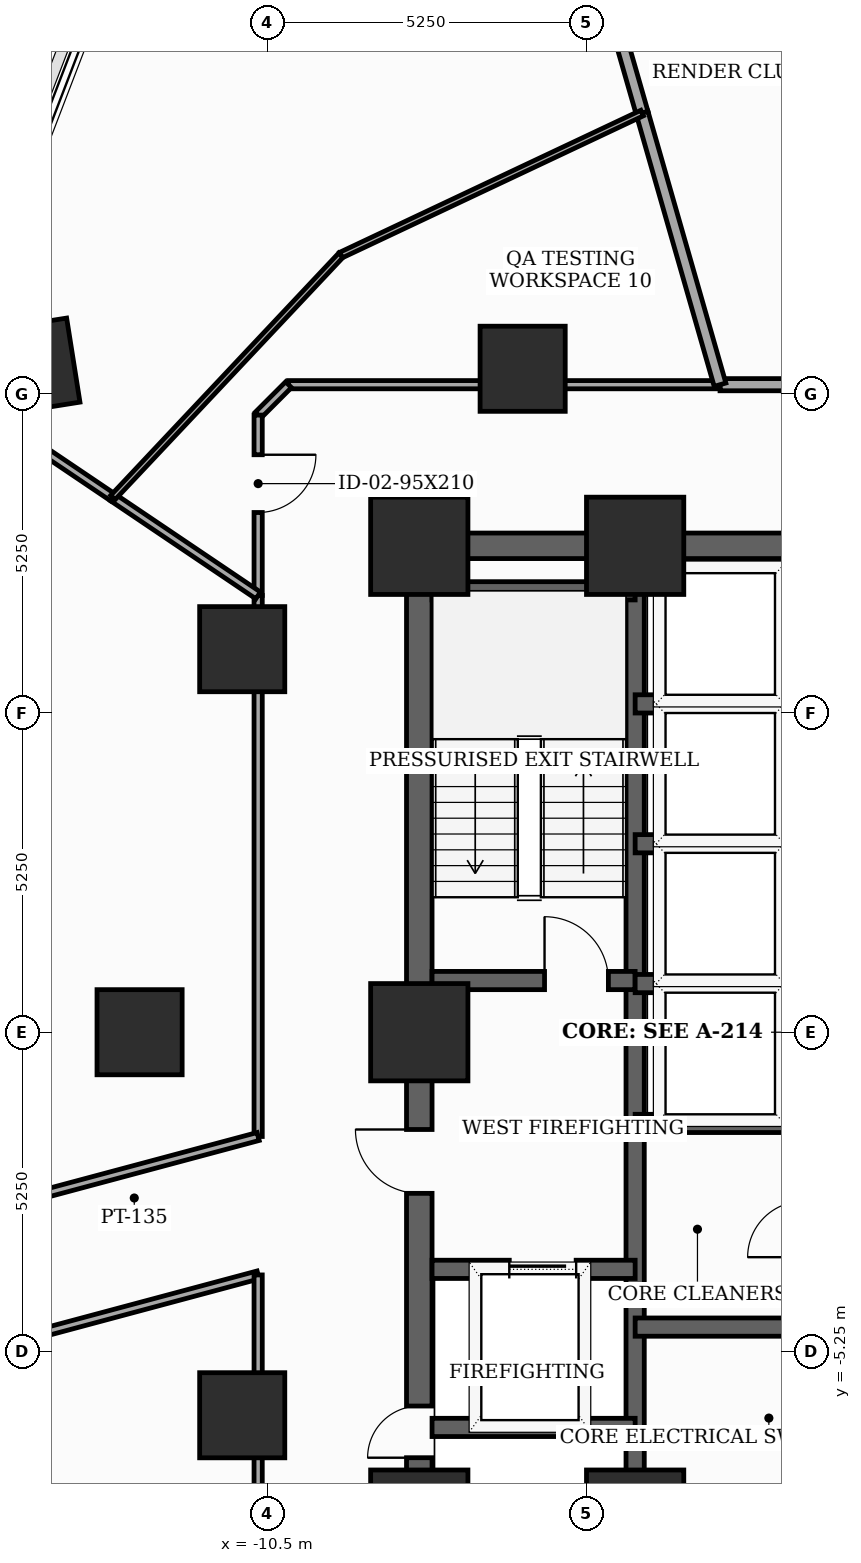
"""IFC4 building model, lengths in metres.
Left out: names, types, materials, properties, quantities, classifications, styles, units other than length and angle.
Written with IfcOpenShell. Run it as: python <this file> out.ifc"""

import sys

from ifc_helpers import new_model, si_unit, direction, frame, frame_2d, origin, origin_2d, place, context, subcontext, project, spatial, rectangle, extrude, element, fill, save


model = new_model("IFC4")
c1 = context("Model", 3, precision=1e-05, world=origin(), true_north=direction((0.0, 1.0)))
c2 = subcontext(c1, "Body", "Model", "MODEL_VIEW")
j1 = project(units=[si_unit("LENGTHUNIT", "METRE"), si_unit("PLANEANGLEUNIT", "RADIAN")], contexts=[c1])
p1 = place(None, origin())
s1 = spatial("IfcSite", under=j1, at=p1, CompositionType="ELEMENT")
p2 = place(p1, origin())
s2 = spatial("IfcBuilding", under=s1, at=p2, CompositionType="ELEMENT")
p3 = place(p2, frame((0.0, 0.0, 59.3)))
s3 = spatial("IfcBuildingStorey", under=s2, at=p3, CompositionType="ELEMENT", Elevation=59.3)
for number, where, z_axis, x_axis in (
    (1, (-8.0, -8.0, 0.0), (0.0, 0.0, 1.0), (1.0, 0.0, 0.0)),
    (2, (-4.45, -8.0, 0.0), (0.0, 0.0, 1.0), (1.0, 0.0, 0.0)),
    (3, (-4.45, 8.0, 0.0), (0.0, 0.0, 1.0), (1.0, 0.0, 0.0)),
    (4, (-8.0, 8.0, 0.0), (0.0, 0.0, 1.0), (1.0, 0.0, 0.0)),
    (5, (-8.0, 0.0, 0.0), (0.0, 0.0, 1.0), (1.0, 0.0, 0.0)),
):
    element("IfcColumn", number, at=place(p3, frame(where, z_axis=z_axis, x_axis=x_axis)), inside=s3, PredefinedType="COLUMN", context=c2, shape_type="SweptSolid", body=[
        extrude(rectangle(XDim=1.6, YDim=1.6, at=origin_2d()), origin(), (0.0, 0.0, 1.0), 3.7),
    ])
for number, where, z_axis, x_axis in (
    (6, (-6.3, 10.912, 0.0), (0.0, 0.0, 1.0), (1.0, 0.0, 0.0)),
    (7, (-10.912, 6.3, 0.0), (0.0, 0.0, 1.0), (1.0, 0.0, 0.0)),
    (8, (-12.6, 0.0, 0.0), (0.0, 0.0, 1.0), (1.0, 0.0, 0.0)),
    (9, (-10.912, -6.3, 0.0), (0.0, 0.0, 1.0), (1.0, 0.0, 0.0)),
    (10, (-14.381, 10.945, 0.0), (0.0, 0.0, 1.0), (0.988, 0.156, 0.0)),
):
    element("IfcColumn", number, at=place(p3, frame(where, z_axis=z_axis, x_axis=x_axis)), inside=s3, PredefinedType="COLUMN", context=c2, shape_type="SweptSolid", body=[
        extrude(rectangle(XDim=1.4, YDim=1.4, at=origin_2d()), origin(), (0.0, 0.0, 1.0), 3.7),
    ])
p4 = place(p3, frame((-8.0, -8.0, 0.0), z_axis=(0.0, 0.0, 1.0), x_axis=(0.0, 1.0, 0.0)))
e11 = element("IfcWall", 11, at=p4, inside=s3, PredefinedType="SHEAR", context=c2, shape_type="SweptSolid", body=[
    extrude(rectangle(XDim=16.0, YDim=0.42, at=frame_2d((8.0, 0.0))), origin(), (0.0, 0.0, 1.0), 3.5),
])
p5 = place(p4, frame((1.002, 0.0, 0.0)))
e12 = element("IfcOpeningElement", 12, at=p5, cuts=e11, PredefinedType="OPENING", context=c2, shape_type="SweptSolid", body=[
    extrude(rectangle(XDim=0.85, YDim=2.02, at=frame_2d((0.425, 1.01))), frame((0.0, 0.22, 0.0), z_axis=(0.0, -1.0, 0.0), x_axis=(1.0, 0.0, 0.0)), (0.0, 0.0, 1.0), 0.44),
])
p6 = place(p4, frame((5.35, 0.0, 0.0)))
e13 = element("IfcOpeningElement", 13, at=p6, cuts=e11, PredefinedType="OPENING", context=c2, shape_type="SweptSolid", body=[
    extrude(rectangle(XDim=1.05, YDim=2.15, at=frame_2d((0.525, 1.075))), frame((0.0, 0.22, 0.0), z_axis=(0.0, -1.0, 0.0), x_axis=(1.0, 0.0, 0.0)), (0.0, 0.0, 1.0), 0.44),
])
p7 = place(p3, frame((-8.0, 8.0, 0.0), z_axis=(0.0, 0.0, 1.0), x_axis=(1.0, 0.0, 0.0)))
e14 = element("IfcWall", 14, at=p7, inside=s3, PredefinedType="SHEAR", context=c2, shape_type="SweptSolid", body=[
    extrude(rectangle(XDim=16.0, YDim=0.42, at=frame_2d((8.0, 0.0))), origin(), (0.0, 0.0, 1.0), 3.5),
])
p8 = place(p7, frame((7.1, 0.0, 0.0)))
e15 = element("IfcOpeningElement", 15, at=p8, cuts=e14, PredefinedType="OPENING", context=c2, shape_type="SweptSolid", body=[
    extrude(rectangle(XDim=1.8, YDim=2.15, at=frame_2d((0.9, 1.075))), frame((0.0, 0.22, 0.0), z_axis=(0.0, -1.0, 0.0), x_axis=(1.0, 0.0, 0.0)), (0.0, 0.0, 1.0), 0.44),
])
p9 = place(p3, frame((-4.45, -7.79, 0.0), z_axis=(0.0, 0.0, 1.0), x_axis=(0.0, 1.0, 0.0)))
e16 = element("IfcWall", 16, at=p9, inside=s3, PredefinedType="SHEAR", context=c2, shape_type="SweptSolid", body=[
    extrude(rectangle(XDim=15.58, YDim=0.3, at=frame_2d((7.79, 0.0))), origin(), (0.0, 0.0, 1.0), 3.5),
])
p10 = place(p3, frame((-7.79, 0.85, 0.0), z_axis=(0.0, 0.0, 1.0), x_axis=(1.0, 0.0, 0.0)))
e17 = element("IfcWall", 17, at=p10, inside=s3, PredefinedType="SHEAR", context=c2, shape_type="SweptSolid", body=[
    extrude(rectangle(XDim=3.34, YDim=0.3, at=frame_2d((1.67, 0.0))), origin(), (0.0, 0.0, 1.0), 3.5),
])
p11 = place(p10, frame((1.85, 0.0, 0.0)))
e18 = element("IfcOpeningElement", 18, at=p11, cuts=e17, PredefinedType="OPENING", context=c2, shape_type="SweptSolid", body=[
    extrude(rectangle(XDim=1.05, YDim=2.15, at=frame_2d((0.525, 1.075))), frame((0.0, 0.16, 0.0), z_axis=(0.0, -1.0, 0.0), x_axis=(1.0, 0.0, 0.0)), (0.0, 0.0, 1.0), 0.32),
])
p12 = place(p3, frame((-7.79, 7.26, 0.0), z_axis=(0.0, 0.0, 1.0), x_axis=(1.0, 0.0, 0.0)))
e19 = element("IfcWall", 19, at=p12, inside=s3, PredefinedType="SHEAR", context=c2, shape_type="SweptSolid", body=[
    extrude(rectangle(XDim=3.34, YDim=0.3, at=frame_2d((1.67, 0.0))), origin(), (0.0, 0.0, 1.0), 3.5),
])
p13 = place(p3, frame((-7.79, -3.9, 0.0), z_axis=(0.0, 0.0, 1.0), x_axis=(1.0, 0.0, 0.0)))
e20 = element("IfcWall", 20, at=p13, inside=s3, PredefinedType="SHEAR", context=c2, shape_type="SweptSolid", body=[
    extrude(rectangle(XDim=3.34, YDim=0.3, at=frame_2d((1.67, 0.0))), origin(), (0.0, 0.0, 1.0), 3.5),
])
p14 = place(p13, frame((1.27, 0.0, 0.0)))
e21 = element("IfcOpeningElement", 21, at=p14, cuts=e20, PredefinedType="OPENING", context=c2, shape_type="SweptSolid", body=[
    extrude(rectangle(XDim=1.1, YDim=2.1, at=frame_2d((0.55, 1.05))), frame((0.0, 0.16, 0.0), z_axis=(0.0, -1.0, 0.0), x_axis=(1.0, 0.0, 0.0)), (0.0, 0.0, 1.0), 0.32),
])
p15 = place(p3, frame((-7.79, -6.5, 0.0), z_axis=(0.0, 0.0, 1.0), x_axis=(1.0, 0.0, 0.0)))
e22 = element("IfcWall", 22, at=p15, inside=s3, PredefinedType="SHEAR", context=c2, shape_type="SweptSolid", body=[
    extrude(rectangle(XDim=3.34, YDim=0.3, at=frame_2d((1.67, 0.0))), origin(), (0.0, 0.0, 1.0), 3.5),
])
p16 = place(p3, frame((-4.45, -4.85, 0.0), z_axis=(0.0, 0.0, 1.0), x_axis=(1.0, 0.0, 0.0)))
e23 = element("IfcWall", 23, at=p16, inside=s3, PredefinedType="SHEAR", context=c2, shape_type="SweptSolid", body=[
    extrude(rectangle(XDim=8.9, YDim=0.3, at=frame_2d((4.45, 0.0))), origin(), (0.0, 0.0, 1.0), 3.5),
])
for number, where, z_axis, x_axis in (
    (24, (-4.45, -1.5, 0.0), (0.0, 0.0, 1.0), (1.0, 0.0, 0.0)),
    (25, (-4.45, 0.8, 0.0), (0.0, 0.0, 1.0), (1.0, 0.0, 0.0)),
    (26, (-4.45, 3.1, 0.0), (0.0, 0.0, 1.0), (1.0, 0.0, 0.0)),
    (27, (-4.45, 5.4, 0.0), (0.0, 0.0, 1.0), (1.0, 0.0, 0.0)),
):
    element("IfcWall", number, at=place(p3, frame(where, z_axis=z_axis, x_axis=x_axis)), inside=s3, PredefinedType="SHEAR", context=c2, shape_type="SweptSolid", body=[
        extrude(rectangle(XDim=2.77, YDim=0.3, at=frame_2d((1.385, 0.0))), origin(), (0.0, 0.0, 1.0), 3.5),
    ])
p17 = place(p3, frame((-10.65, 7.184, 0.0), z_axis=(0.0, 0.0, 1.0), x_axis=(0.0, -1.0, 0.0)))
e28 = element("IfcWall", 28, at=p17, inside=s3, PredefinedType="PARTITIONING", context=c2, shape_type="SweptSolid", body=[
    extrude(rectangle(XDim=8.899, YDim=0.135, at=frame_2d((4.45, 0.0))), origin(), (0.0, 0.0, 1.0), 2.785),
])
p18 = place(p3, frame((-10.65, -1.715, 0.0), z_axis=(0.0, 0.0, 1.0), x_axis=(-0.965937452198, -0.258775652721, 0.0)))
e29 = element("IfcWall", 29, at=p18, inside=s3, PredefinedType="PARTITIONING", context=c2, shape_type="SweptSolid", body=[
    extrude(rectangle(XDim=9.869, YDim=0.135, at=frame_2d((4.935, 0.0))), origin(), (0.0, 0.0, 1.0), 2.785),
])
p19 = place(p18, frame((4.46, 0.0, 0.0)))
e30 = element("IfcOpeningElement", 30, at=p19, cuts=e29, PredefinedType="OPENING", context=c2, shape_type="SweptSolid", body=[
    extrude(rectangle(XDim=0.95, YDim=2.1, at=frame_2d((0.475, 1.05))), frame((0.0, 0.077, 0.0), z_axis=(0.0, -1.0, 0.0), x_axis=(1.0, 0.0, 0.0)), (0.0, 0.0, 1.0), 0.155),
])
p20 = place(p3, frame((-19.613, -6.394, 0.0), z_axis=(0.0, 0.0, 1.0), x_axis=(0.96591410887, 0.258862771148, 0.0)))
e31 = element("IfcWall", 31, at=p20, inside=s3, PredefinedType="PARTITIONING", context=c2, shape_type="SweptSolid", body=[
    extrude(rectangle(XDim=9.28, YDim=0.135, at=frame_2d((4.64, 0.0))), origin(), (0.0, 0.0, 1.0), 2.785),
])
p21 = place(p3, frame((-10.65, -3.992, 0.0), z_axis=(0.0, 0.0, 1.0), x_axis=(0.0, -1.0, 0.0)))
e32 = element("IfcWall", 32, at=p21, inside=s3, PredefinedType="PARTITIONING", context=c2, shape_type="SweptSolid", body=[
    extrude(rectangle(XDim=6.158, YDim=0.135, at=frame_2d((3.079, 0.0))), origin(), (0.0, 0.0, 1.0), 2.785),
])
p22 = place(p3, frame((1.715, 10.65, 0.0), z_axis=(0.0, 0.0, 1.0), x_axis=(-1.0, 0.0, 0.0)))
e33 = element("IfcWall", 33, at=p22, inside=s3, PredefinedType="SOLIDWALL", context=c2, shape_type="SweptSolid", body=[
    extrude(rectangle(XDim=4.769, YDim=0.2, at=frame_2d((2.385, 0.0))), origin(), (0.0, 0.0, 1.0), 2.785),
])
p23 = place(p3, frame((-3.054, 10.65, 0.0), z_axis=(0.0, 0.0, 1.0), x_axis=(-1.0, 0.0, 0.0)))
e34 = element("IfcWall", 34, at=p23, inside=s3, PredefinedType="PARTITIONING", context=c2, shape_type="SweptSolid", body=[
    extrude(rectangle(XDim=7.096, YDim=0.135, at=frame_2d((3.548, 0.0))), origin(), (0.0, 0.0, 1.0), 2.785),
])
p24 = place(p3, frame((-10.15, 10.65, 0.0), z_axis=(0.0, 0.0, 1.0), x_axis=(-0.707106781187, -0.707106781187, 0.0)))
e35 = element("IfcWall", 35, at=p24, inside=s3, PredefinedType="PARTITIONING", context=c2, shape_type="SweptSolid", body=[
    extrude(rectangle(XDim=0.707, YDim=0.135, at=frame_2d((0.354, 0.0))), origin(), (0.0, 0.0, 1.0), 3.5),
])
p25 = place(p3, frame((-10.65, 10.15, 0.0), z_axis=(0.0, 0.0, 1.0), x_axis=(0.0, -1.0, 0.0)))
e36 = element("IfcWall", 36, at=p25, inside=s3, PredefinedType="PARTITIONING", context=c2, shape_type="SweptSolid", body=[
    extrude(rectangle(XDim=2.966, YDim=0.135, at=frame_2d((1.483, 0.0))), origin(), (0.0, 0.0, 1.0), 3.5),
])
p26 = place(p25, frame((0.652, 0.0, 0.0)))
e37 = element("IfcOpeningElement", 37, at=p26, cuts=e36, PredefinedType="OPENING", context=c2, shape_type="SweptSolid", body=[
    extrude(rectangle(XDim=0.95, YDim=2.1, at=frame_2d((0.475, 1.05))), frame((0.0, 0.077, 0.0), z_axis=(0.0, -1.0, 0.0), x_axis=(1.0, 0.0, 0.0)), (0.0, 0.0, 1.0), 0.155),
])
p27 = place(p3, frame((-13.038, 8.795, 0.0), z_axis=(0.0, 0.0, 1.0), x_axis=(-0.829071326064, 0.559142858578, 0.0)))
e38 = element("IfcWall", 38, at=p27, inside=s3, PredefinedType="PARTITIONING", context=c2, shape_type="SweptSolid", body=[
    extrude(rectangle(XDim=3.279, YDim=0.135, at=frame_2d((1.639, 0.0))), origin(), (0.0, 0.0, 1.0), 2.785),
])
p28 = place(p3, frame((-10.65, 7.184, 0.0), z_axis=(0.0, 0.0, 1.0), x_axis=(-0.829039234985, 0.559190438809, 0.0)))
e39 = element("IfcWall", 39, at=p28, inside=s3, PredefinedType="PARTITIONING", context=c2, shape_type="SweptSolid", body=[
    extrude(rectangle(XDim=2.881, YDim=0.135, at=frame_2d((1.44, 0.0))), origin(), (0.0, 0.0, 1.0), 2.785),
])
p29 = place(p3, frame((-4.689, 16.351, 0.0), z_axis=(0.0, 0.0, 1.0), x_axis=(0.275927308223, -0.961178506094, 0.0)))
e40 = element("IfcWall", 40, at=p29, inside=s3, PredefinedType="SOLIDWALL", context=c2, shape_type="SweptSolid", body=[
    extrude(rectangle(XDim=1.283, YDim=0.2, at=frame_2d((0.642, 0.0))), origin(), (0.0, 0.0, 1.0), 3.5),
])
p30 = place(p3, frame((-4.335, 15.118, 0.0), z_axis=(0.0, 0.0, 1.0), x_axis=(0.275602055924, -0.961271817318, 0.0)))
e41 = element("IfcWall", 41, at=p30, inside=s3, PredefinedType="SOLIDWALL", context=c2, shape_type="SweptSolid", body=[
    extrude(rectangle(XDim=4.648, YDim=0.2, at=frame_2d((2.324, 0.0))), origin(), (0.0, 0.0, 1.0), 2.785),
])
p31 = place(p3, frame((-13.038, 8.795, 0.0), z_axis=(0.0, 0.0, 1.0), x_axis=(0.685214439986, 0.728341383716, 0.0)))
e42 = element("IfcWall", 42, at=p31, inside=s3, PredefinedType="MOVABLE", context=c2, shape_type="SweptSolid", body=[
    extrude(rectangle(XDim=5.474, YDim=0.1, at=frame_2d((2.737, 0.0))), origin(), (0.0, 0.0, 1.0), 2.785),
])
p32 = place(p3, frame((-9.287, 12.782, 0.0), z_axis=(0.0, 0.0, 1.0), x_axis=(0.904430294069, 0.4266214284, 0.0)))
e43 = element("IfcWall", 43, at=p32, inside=s3, PredefinedType="MOVABLE", context=c2, shape_type="SweptSolid", body=[
    extrude(rectangle(XDim=5.475, YDim=0.1, at=frame_2d((2.738, 0.0))), origin(), (0.0, 0.0, 1.0), 2.785),
])
p33 = place(p5, origin())
e44 = element("IfcDoor", 44, at=p33, inside=s3, OperationType="SINGLE_SWING_LEFT", PredefinedType="TRAPDOOR", context=c2, shape_type="SweptSolid", body=[
    extrude(rectangle(XDim=0.85, YDim=2.02, at=frame_2d((0.425, 1.01))), frame((0.0, 0.025, 0.0), z_axis=(0.0, -1.0, 0.0), x_axis=(1.0, 0.0, 0.0)), (0.0, 0.0, 1.0), 0.05),
])
fill(e12, e44)
p34 = place(p6, origin())
e45 = element("IfcDoor", 45, at=p34, inside=s3, OperationType="SINGLE_SWING_RIGHT", PredefinedType="DOOR", context=c2, shape_type="SweptSolid", body=[
    extrude(rectangle(XDim=1.05, YDim=2.15, at=frame_2d((0.525, 1.075))), frame((0.0, 0.025, 0.0), z_axis=(0.0, -1.0, 0.0), x_axis=(1.0, 0.0, 0.0)), (0.0, 0.0, 1.0), 0.05),
])
fill(e13, e45)
p35 = place(p11, origin())
e46 = element("IfcDoor", 46, at=p35, inside=s3, OperationType="SINGLE_SWING_LEFT", PredefinedType="DOOR", context=c2, shape_type="SweptSolid", body=[
    extrude(rectangle(XDim=1.05, YDim=2.15, at=frame_2d((0.525, 1.075))), frame((0.0, 0.025, 0.0), z_axis=(0.0, -1.0, 0.0), x_axis=(1.0, 0.0, 0.0)), (0.0, 0.0, 1.0), 0.05),
])
fill(e18, e46)
p36 = place(p14, origin())
e47 = element("IfcDoor", 47, at=p36, inside=s3, OperationType="SLIDING_TO_LEFT", PredefinedType="DOOR", context=c2, shape_type="SweptSolid", body=[
    extrude(rectangle(XDim=1.1, YDim=2.1, at=frame_2d((0.55, 1.05))), frame((0.0, 0.025, 0.0), z_axis=(0.0, -1.0, 0.0), x_axis=(1.0, 0.0, 0.0)), (0.0, 0.0, 1.0), 0.05),
])
fill(e21, e47)
p37 = place(p26, origin())
e48 = element("IfcDoor", 48, at=p37, inside=s3, OperationType="SINGLE_SWING_LEFT", PredefinedType="DOOR", context=c2, shape_type="SweptSolid", body=[
    extrude(rectangle(XDim=0.95, YDim=2.1, at=frame_2d((0.475, 1.05))), frame((0.0, 0.025, 0.0), z_axis=(0.0, -1.0, 0.0), x_axis=(1.0, 0.0, 0.0)), (0.0, 0.0, 1.0), 0.05),
])
fill(e37, e48)
save(model, sys.argv[1])
